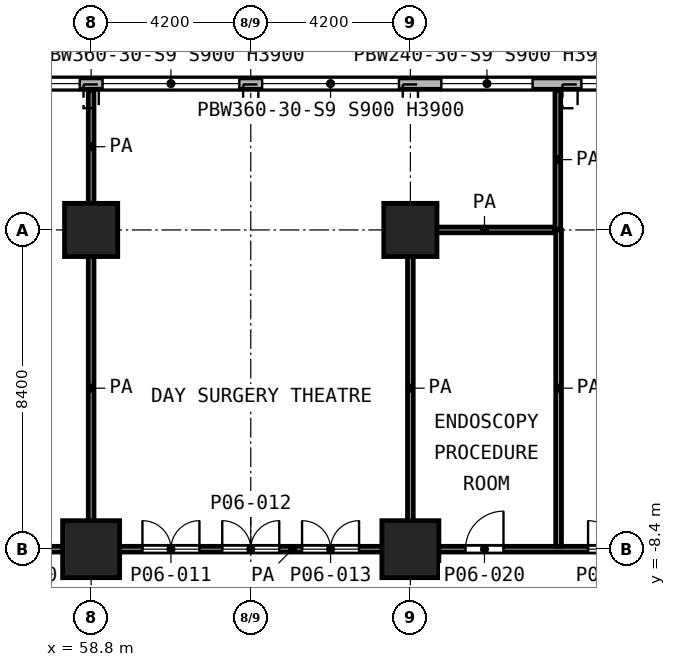
"""IFC4 building model, lengths in metres.
Left out: names, types, materials, properties, quantities, classifications, styles, units other than length and angle.
Written with IfcOpenShell. Run it as: python <this file> out.ifc"""

import sys

from ifc_helpers import new_model, si_unit, direction, frame, frame_2d, origin, origin_2d, place, context, subcontext, project, spatial, rectangle, extrude, element, fill, save


model = new_model("IFC4")
c1 = context("Model", 3, precision=1e-05, world=origin(), true_north=direction((0.0, 1.0)))
c2 = subcontext(c1, "Body", "Model", "MODEL_VIEW")
j1 = project(units=[si_unit("LENGTHUNIT", "METRE"), si_unit("PLANEANGLEUNIT", "RADIAN")], contexts=[c1])
p1 = place(None, origin())
s1 = spatial("IfcSite", under=j1, at=p1, CompositionType="ELEMENT")
p2 = place(p1, origin())
s2 = spatial("IfcBuilding", under=s1, at=p2, CompositionType="ELEMENT")
p3 = place(p2, frame((0.0, 0.0, 29.0)))
s3 = spatial("IfcBuildingStorey", under=s2, at=p3, CompositionType="ELEMENT", Elevation=29.0)
for number, where, z_axis, x_axis in (
    (1, (58.8, 0.0, 0.0), (0.0, 0.0, 1.0), (1.0, 0.0, 0.0)),
    (2, (67.2, 0.0, 0.0), (0.0, 0.0, 1.0), (1.0, 0.0, 0.0)),
):
    element("IfcColumn", number, at=place(p3, frame(where, z_axis=z_axis, x_axis=x_axis)), inside=s3, PredefinedType="COLUMN", context=c2, shape_type="SweptSolid", body=[
        extrude(rectangle(XDim=1.4, YDim=1.4, at=origin_2d()), origin(), (0.0, 0.0, 1.0), 5.2),
    ])
for number, where, z_axis, x_axis in (
    (3, (58.8, -8.4, 0.0), (0.0, 0.0, 1.0), (1.0, 0.0, 0.0)),
    (4, (67.2, -8.4, 0.0), (0.0, 0.0, 1.0), (1.0, 0.0, 0.0)),
):
    element("IfcColumn", number, at=place(p3, frame(where, z_axis=z_axis, x_axis=x_axis)), inside=s3, PredefinedType="COLUMN", context=c2, shape_type="SweptSolid", body=[
        extrude(rectangle(XDim=1.5, YDim=1.5, at=origin_2d()), origin(), (0.0, 0.0, 1.0), 5.2),
    ])
p4 = place(p3, frame((90.338, 3.85, 0.0), z_axis=(0.0, 0.0, 1.0), x_axis=(-1.0, 0.0, 0.0)))
e5 = element("IfcWall", 5, at=p4, inside=s3, PredefinedType="SOLIDWALL", context=c2, shape_type="SweptSolid", body=[
    extrude(rectangle(XDim=88.276, YDim=0.3, at=frame_2d((44.138, 0.0))), origin(), (0.0, 0.0, 1.0), 4.7),
])
p5 = place(p4, frame((0.438, 0.0, 0.9)))
e6 = element("IfcOpeningElement", 6, at=p5, cuts=e5, PredefinedType="OPENING", context=c2, shape_type="SweptSolid", body=[
    extrude(rectangle(XDim=1.2, YDim=3.0, at=frame_2d((0.6, 1.5))), frame((0.0, 0.16, 0.0), z_axis=(0.0, -1.0, 0.0), x_axis=(1.0, 0.0, 0.0)), (0.0, 0.0, 1.0), 0.32),
])
p6 = place(p4, frame((2.438, 0.0, 0.9)))
e7 = element("IfcOpeningElement", 7, at=p6, cuts=e5, PredefinedType="OPENING", context=c2, shape_type="SweptSolid", body=[
    extrude(rectangle(XDim=3.6, YDim=3.0, at=frame_2d((1.8, 1.5))), frame((0.0, 0.16, 0.0), z_axis=(0.0, -1.0, 0.0), x_axis=(1.0, 0.0, 0.0)), (0.0, 0.0, 1.0), 0.32),
])
p7 = place(p4, frame((6.638, 0.0, 0.9)))
e8 = element("IfcOpeningElement", 8, at=p7, cuts=e5, PredefinedType="OPENING", context=c2, shape_type="SweptSolid", body=[
    extrude(rectangle(XDim=3.6, YDim=3.0, at=frame_2d((1.8, 1.5))), frame((0.0, 0.16, 0.0), z_axis=(0.0, -1.0, 0.0), x_axis=(1.0, 0.0, 0.0)), (0.0, 0.0, 1.0), 0.32),
])
p8 = place(p4, frame((10.838, 0.0, 0.9)))
e9 = element("IfcOpeningElement", 9, at=p8, cuts=e5, PredefinedType="OPENING", context=c2, shape_type="SweptSolid", body=[
    extrude(rectangle(XDim=3.6, YDim=3.0, at=frame_2d((1.8, 1.5))), frame((0.0, 0.16, 0.0), z_axis=(0.0, -1.0, 0.0), x_axis=(1.0, 0.0, 0.0)), (0.0, 0.0, 1.0), 0.32),
])
p9 = place(p4, frame((15.038, 0.0, 0.9)))
e10 = element("IfcOpeningElement", 10, at=p9, cuts=e5, PredefinedType="OPENING", context=c2, shape_type="SweptSolid", body=[
    extrude(rectangle(XDim=3.6, YDim=3.0, at=frame_2d((1.8, 1.5))), frame((0.0, 0.16, 0.0), z_axis=(0.0, -1.0, 0.0), x_axis=(1.0, 0.0, 0.0)), (0.0, 0.0, 1.0), 0.32),
])
p10 = place(p4, frame((19.923, 0.0, 0.9)))
e11 = element("IfcOpeningElement", 11, at=p10, cuts=e5, PredefinedType="OPENING", context=c2, shape_type="SweptSolid", body=[
    extrude(rectangle(XDim=2.4, YDim=3.0, at=frame_2d((1.2, 1.5))), frame((0.0, 0.16, 0.0), z_axis=(0.0, -1.0, 0.0), x_axis=(1.0, 0.0, 0.0)), (0.0, 0.0, 1.0), 0.32),
])
p11 = place(p4, frame((23.438, 0.0, 0.9)))
e12 = element("IfcOpeningElement", 12, at=p11, cuts=e5, PredefinedType="OPENING", context=c2, shape_type="SweptSolid", body=[
    extrude(rectangle(XDim=3.6, YDim=3.0, at=frame_2d((1.8, 1.5))), frame((0.0, 0.16, 0.0), z_axis=(0.0, -1.0, 0.0), x_axis=(1.0, 0.0, 0.0)), (0.0, 0.0, 1.0), 0.32),
])
p12 = place(p4, frame((27.638, 0.0, 0.9)))
e13 = element("IfcOpeningElement", 13, at=p12, cuts=e5, PredefinedType="OPENING", context=c2, shape_type="SweptSolid", body=[
    extrude(rectangle(XDim=3.6, YDim=3.0, at=frame_2d((1.8, 1.5))), frame((0.0, 0.16, 0.0), z_axis=(0.0, -1.0, 0.0), x_axis=(1.0, 0.0, 0.0)), (0.0, 0.0, 1.0), 0.32),
])
p13 = place(p4, frame((31.838, 0.0, 0.9)))
e14 = element("IfcOpeningElement", 14, at=p13, cuts=e5, PredefinedType="OPENING", context=c2, shape_type="SweptSolid", body=[
    extrude(rectangle(XDim=3.6, YDim=3.0, at=frame_2d((1.8, 1.5))), frame((0.0, 0.16, 0.0), z_axis=(0.0, -1.0, 0.0), x_axis=(1.0, 0.0, 0.0)), (0.0, 0.0, 1.0), 0.32),
])
p14 = place(p4, frame((36.038, 0.0, 0.9)))
e15 = element("IfcOpeningElement", 15, at=p14, cuts=e5, PredefinedType="OPENING", context=c2, shape_type="SweptSolid", body=[
    extrude(rectangle(XDim=3.6, YDim=3.0, at=frame_2d((1.8, 1.5))), frame((0.0, 0.16, 0.0), z_axis=(0.0, -1.0, 0.0), x_axis=(1.0, 0.0, 0.0)), (0.0, 0.0, 1.0), 0.32),
])
p15 = place(p4, frame((40.238, 0.0, 0.9)))
e16 = element("IfcOpeningElement", 16, at=p15, cuts=e5, PredefinedType="OPENING", context=c2, shape_type="SweptSolid", body=[
    extrude(rectangle(XDim=3.6, YDim=3.0, at=frame_2d((1.8, 1.5))), frame((0.0, 0.16, 0.0), z_axis=(0.0, -1.0, 0.0), x_axis=(1.0, 0.0, 0.0)), (0.0, 0.0, 1.0), 0.32),
])
p16 = place(p4, frame((44.773, 0.0, 0.9)))
e17 = element("IfcOpeningElement", 17, at=p16, cuts=e5, PredefinedType="OPENING", context=c2, shape_type="SweptSolid", body=[
    extrude(rectangle(XDim=2.4, YDim=3.0, at=frame_2d((1.2, 1.5))), frame((0.0, 0.16, 0.0), z_axis=(0.0, -1.0, 0.0), x_axis=(1.0, 0.0, 0.0)), (0.0, 0.0, 1.0), 0.32),
])
p17 = place(p4, frame((49.173, 0.0, 0.9)))
e18 = element("IfcOpeningElement", 18, at=p17, cuts=e5, PredefinedType="OPENING", context=c2, shape_type="SweptSolid", body=[
    extrude(rectangle(XDim=2.4, YDim=3.0, at=frame_2d((1.2, 1.5))), frame((0.0, 0.16, 0.0), z_axis=(0.0, -1.0, 0.0), x_axis=(1.0, 0.0, 0.0)), (0.0, 0.0, 1.0), 0.32),
])
p18 = place(p4, frame((52.838, 0.0, 0.9)))
e19 = element("IfcOpeningElement", 19, at=p18, cuts=e5, PredefinedType="OPENING", context=c2, shape_type="SweptSolid", body=[
    extrude(rectangle(XDim=3.6, YDim=3.0, at=frame_2d((1.8, 1.5))), frame((0.0, 0.16, 0.0), z_axis=(0.0, -1.0, 0.0), x_axis=(1.0, 0.0, 0.0)), (0.0, 0.0, 1.0), 0.32),
])
p19 = place(p4, frame((57.038, 0.0, 0.9)))
e20 = element("IfcOpeningElement", 20, at=p19, cuts=e5, PredefinedType="OPENING", context=c2, shape_type="SweptSolid", body=[
    extrude(rectangle(XDim=3.6, YDim=3.0, at=frame_2d((1.8, 1.5))), frame((0.0, 0.16, 0.0), z_axis=(0.0, -1.0, 0.0), x_axis=(1.0, 0.0, 0.0)), (0.0, 0.0, 1.0), 0.32),
])
p20 = place(p4, frame((61.923, 0.0, 0.9)))
e21 = element("IfcOpeningElement", 21, at=p20, cuts=e5, PredefinedType="OPENING", context=c2, shape_type="SweptSolid", body=[
    extrude(rectangle(XDim=2.4, YDim=3.0, at=frame_2d((1.2, 1.5))), frame((0.0, 0.16, 0.0), z_axis=(0.0, -1.0, 0.0), x_axis=(1.0, 0.0, 0.0)), (0.0, 0.0, 1.0), 0.32),
])
p21 = place(p4, frame((65.438, 0.0, 0.9)))
e22 = element("IfcOpeningElement", 22, at=p21, cuts=e5, PredefinedType="OPENING", context=c2, shape_type="SweptSolid", body=[
    extrude(rectangle(XDim=3.6, YDim=3.0, at=frame_2d((1.8, 1.5))), frame((0.0, 0.16, 0.0), z_axis=(0.0, -1.0, 0.0), x_axis=(1.0, 0.0, 0.0)), (0.0, 0.0, 1.0), 0.32),
])
p22 = place(p4, frame((69.638, 0.0, 0.9)))
e23 = element("IfcOpeningElement", 23, at=p22, cuts=e5, PredefinedType="OPENING", context=c2, shape_type="SweptSolid", body=[
    extrude(rectangle(XDim=3.6, YDim=3.0, at=frame_2d((1.8, 1.5))), frame((0.0, 0.16, 0.0), z_axis=(0.0, -1.0, 0.0), x_axis=(1.0, 0.0, 0.0)), (0.0, 0.0, 1.0), 0.32),
])
p23 = place(p4, frame((73.838, 0.0, 0.9)))
e24 = element("IfcOpeningElement", 24, at=p23, cuts=e5, PredefinedType="OPENING", context=c2, shape_type="SweptSolid", body=[
    extrude(rectangle(XDim=3.6, YDim=3.0, at=frame_2d((1.8, 1.5))), frame((0.0, 0.16, 0.0), z_axis=(0.0, -1.0, 0.0), x_axis=(1.0, 0.0, 0.0)), (0.0, 0.0, 1.0), 0.32),
])
p24 = place(p4, frame((78.038, 0.0, 0.9)))
e25 = element("IfcOpeningElement", 25, at=p24, cuts=e5, PredefinedType="OPENING", context=c2, shape_type="SweptSolid", body=[
    extrude(rectangle(XDim=3.6, YDim=3.0, at=frame_2d((1.8, 1.5))), frame((0.0, 0.16, 0.0), z_axis=(0.0, -1.0, 0.0), x_axis=(1.0, 0.0, 0.0)), (0.0, 0.0, 1.0), 0.32),
])
p25 = place(p4, frame((82.238, 0.0, 0.9)))
e26 = element("IfcOpeningElement", 26, at=p25, cuts=e5, PredefinedType="OPENING", context=c2, shape_type="SweptSolid", body=[
    extrude(rectangle(XDim=3.6, YDim=3.0, at=frame_2d((1.8, 1.5))), frame((0.0, 0.16, 0.0), z_axis=(0.0, -1.0, 0.0), x_axis=(1.0, 0.0, 0.0)), (0.0, 0.0, 1.0), 0.32),
])
p26 = place(p4, frame((86.638, 0.0, 0.9)))
e27 = element("IfcOpeningElement", 27, at=p26, cuts=e5, PredefinedType="OPENING", context=c2, shape_type="SweptSolid", body=[
    extrude(rectangle(XDim=1.2, YDim=3.0, at=frame_2d((0.6, 1.5))), frame((0.0, 0.16, 0.0), z_axis=(0.0, -1.0, 0.0), x_axis=(1.0, 0.0, 0.0)), (0.0, 0.0, 1.0), 0.32),
])
p27 = place(p3, frame((51.0, -8.4, 0.0), z_axis=(0.0, 0.0, 1.0), x_axis=(1.0, 0.0, 0.0)))
e28 = element("IfcWall", 28, at=p27, inside=s3, PredefinedType="PARTITIONING", context=c2, shape_type="SweptSolid", body=[
    extrude(rectangle(XDim=26.2, YDim=0.15, at=frame_2d((13.1, 0.0))), origin(), (0.0, 0.0, 1.0), 4.7),
])
p28 = place(p27, frame((1.144, 0.0, 0.0)))
e29 = element("IfcOpeningElement", 29, at=p28, cuts=e28, PredefinedType="OPENING", context=c2, shape_type="SweptSolid", body=[
    extrude(rectangle(XDim=1.5, YDim=2.1, at=frame_2d((0.75, 1.05))), frame((0.0, 0.085, 0.0), z_axis=(0.0, -1.0, 0.0), x_axis=(1.0, 0.0, 0.0)), (0.0, 0.0, 1.0), 0.17),
])
p29 = place(p27, frame((3.112, 0.0, 0.0)))
e30 = element("IfcOpeningElement", 30, at=p29, cuts=e28, PredefinedType="OPENING", context=c2, shape_type="SweptSolid", body=[
    extrude(rectangle(XDim=1.5, YDim=2.1, at=frame_2d((0.75, 1.05))), frame((0.0, 0.085, 0.0), z_axis=(0.0, -1.0, 0.0), x_axis=(1.0, 0.0, 0.0)), (0.0, 0.0, 1.0), 0.17),
])
p30 = place(p27, frame((5.081, 0.0, 0.0)))
e31 = element("IfcOpeningElement", 31, at=p30, cuts=e28, PredefinedType="OPENING", context=c2, shape_type="SweptSolid", body=[
    extrude(rectangle(XDim=1.5, YDim=2.1, at=frame_2d((0.75, 1.05))), frame((0.0, 0.085, 0.0), z_axis=(0.0, -1.0, 0.0), x_axis=(1.0, 0.0, 0.0)), (0.0, 0.0, 1.0), 0.17),
])
p31 = place(p27, frame((9.15, 0.0, 0.0)))
e32 = element("IfcOpeningElement", 32, at=p31, cuts=e28, PredefinedType="OPENING", context=c2, shape_type="SweptSolid", body=[
    extrude(rectangle(XDim=1.5, YDim=2.1, at=frame_2d((0.75, 1.05))), frame((0.0, 0.085, 0.0), z_axis=(0.0, -1.0, 0.0), x_axis=(1.0, 0.0, 0.0)), (0.0, 0.0, 1.0), 0.17),
])
p32 = place(p27, frame((11.25, 0.0, 0.0)))
e33 = element("IfcOpeningElement", 33, at=p32, cuts=e28, PredefinedType="OPENING", context=c2, shape_type="SweptSolid", body=[
    extrude(rectangle(XDim=1.5, YDim=2.1, at=frame_2d((0.75, 1.05))), frame((0.0, 0.085, 0.0), z_axis=(0.0, -1.0, 0.0), x_axis=(1.0, 0.0, 0.0)), (0.0, 0.0, 1.0), 0.17),
])
p33 = place(p27, frame((13.35, 0.0, 0.0)))
e34 = element("IfcOpeningElement", 34, at=p33, cuts=e28, PredefinedType="OPENING", context=c2, shape_type="SweptSolid", body=[
    extrude(rectangle(XDim=1.5, YDim=2.1, at=frame_2d((0.75, 1.05))), frame((0.0, 0.085, 0.0), z_axis=(0.0, -1.0, 0.0), x_axis=(1.0, 0.0, 0.0)), (0.0, 0.0, 1.0), 0.17),
])
p34 = place(p27, frame((17.65, 0.0, 0.0)))
e35 = element("IfcOpeningElement", 35, at=p34, cuts=e28, PredefinedType="OPENING", context=c2, shape_type="SweptSolid", body=[
    extrude(rectangle(XDim=1.0, YDim=2.1, at=frame_2d((0.5, 1.05))), frame((0.0, 0.085, 0.0), z_axis=(0.0, -1.0, 0.0), x_axis=(1.0, 0.0, 0.0)), (0.0, 0.0, 1.0), 0.17),
])
p35 = place(p27, frame((20.875, 0.0, 0.0)))
e36 = element("IfcOpeningElement", 36, at=p35, cuts=e28, PredefinedType="OPENING", context=c2, shape_type="SweptSolid", body=[
    extrude(rectangle(XDim=1.5, YDim=2.1, at=frame_2d((0.75, 1.05))), frame((0.0, 0.085, 0.0), z_axis=(0.0, -1.0, 0.0), x_axis=(1.0, 0.0, 0.0)), (0.0, 0.0, 1.0), 0.17),
])
p36 = place(p27, frame((22.7, 0.0, 0.0)))
e37 = element("IfcOpeningElement", 37, at=p36, cuts=e28, PredefinedType="OPENING", context=c2, shape_type="SweptSolid", body=[
    extrude(rectangle(XDim=1.1, YDim=2.1, at=frame_2d((0.55, 1.05))), frame((0.0, 0.085, 0.0), z_axis=(0.0, -1.0, 0.0), x_axis=(1.0, 0.0, 0.0)), (0.0, 0.0, 1.0), 0.17),
])
p37 = place(p3, frame((67.295, 0.0, 0.0), z_axis=(0.0, 0.0, 1.0), x_axis=(1.0, 0.0, 0.0)))
e38 = element("IfcWall", 38, at=p37, inside=s3, PredefinedType="PARTITIONING", context=c2, shape_type="SweptSolid", body=[
    extrude(rectangle(XDim=3.71, YDim=0.15, at=frame_2d((1.855, 0.0))), origin(), (0.0, 0.0, 1.0), 4.7),
])
p38 = place(p3, frame((58.8, -8.325, 0.0), z_axis=(0.0, 0.0, 1.0), x_axis=(0.0, 1.0, 0.0)))
e39 = element("IfcWall", 39, at=p38, inside=s3, PredefinedType="PARTITIONING", context=c2, shape_type="SweptSolid", body=[
    extrude(rectangle(XDim=8.322, YDim=0.15, at=frame_2d((4.161, 0.0))), origin(), (0.0, 0.0, 1.0), 4.7),
])
p39 = place(p3, frame((58.8, 0.7, 0.0), z_axis=(0.0, 0.0, 1.0), x_axis=(0.0, 1.0, 0.0)))
e40 = element("IfcWall", 40, at=p39, inside=s3, PredefinedType="PARTITIONING", context=c2, shape_type="SweptSolid", body=[
    extrude(rectangle(XDim=2.98, YDim=0.15, at=frame_2d((1.49, 0.0))), origin(), (0.0, 0.0, 1.0), 4.7),
])
p40 = place(p3, frame((67.2, -8.325, 0.0), z_axis=(0.0, 0.0, 1.0), x_axis=(0.0, 1.0, 0.0)))
e41 = element("IfcWall", 41, at=p40, inside=s3, PredefinedType="PARTITIONING", context=c2, shape_type="SweptSolid", body=[
    extrude(rectangle(XDim=8.323, YDim=0.15, at=frame_2d((4.162, 0.0))), origin(), (0.0, 0.0, 1.0), 4.7),
])
p41 = place(p3, frame((71.08, 0.02, 0.0), z_axis=(0.0, 0.0, 1.0), x_axis=(0.0, 1.0, 0.0)))
e42 = element("IfcWall", 42, at=p41, inside=s3, PredefinedType="PARTITIONING", context=c2, shape_type="SweptSolid", body=[
    extrude(rectangle(XDim=3.66, YDim=0.15, at=frame_2d((1.83, 0.0))), origin(), (0.0, 0.0, 1.0), 4.7),
])
p42 = place(p3, frame((71.1, -8.325, 0.0), z_axis=(0.0, 0.0, 1.0), x_axis=(0.0, 1.0, 0.0)))
e43 = element("IfcWall", 43, at=p42, inside=s3, PredefinedType="PARTITIONING", context=c2, shape_type="SweptSolid", body=[
    extrude(rectangle(XDim=8.322, YDim=0.15, at=frame_2d((4.161, 0.0))), origin(), (0.0, 0.0, 1.0), 4.7),
])
p43 = place(p9, origin())
e44 = element("IfcWindow", 44, at=p43, inside=s3, PartitioningType="SINGLE_PANEL", PredefinedType="WINDOW", context=c2, shape_type="SweptSolid", body=[
    extrude(rectangle(XDim=3.6, YDim=3.0, at=frame_2d((1.8, 1.5))), frame((0.0, 0.03, 0.0), z_axis=(0.0, -1.0, 0.0), x_axis=(1.0, 0.0, 0.0)), (0.0, 0.0, 1.0), 0.06),
])
fill(e10, e44)
p44 = place(p10, origin())
e45 = element("IfcWindow", 45, at=p44, inside=s3, PartitioningType="SINGLE_PANEL", PredefinedType="WINDOW", context=c2, shape_type="SweptSolid", body=[
    extrude(rectangle(XDim=2.4, YDim=3.0, at=frame_2d((1.2, 1.5))), frame((0.0, 0.03, 0.0), z_axis=(0.0, -1.0, 0.0), x_axis=(1.0, 0.0, 0.0)), (0.0, 0.0, 1.0), 0.06),
])
fill(e11, e45)
p45 = place(p11, origin())
e46 = element("IfcWindow", 46, at=p45, inside=s3, PartitioningType="SINGLE_PANEL", PredefinedType="WINDOW", context=c2, shape_type="SweptSolid", body=[
    extrude(rectangle(XDim=3.6, YDim=3.0, at=frame_2d((1.8, 1.5))), frame((0.0, 0.03, 0.0), z_axis=(0.0, -1.0, 0.0), x_axis=(1.0, 0.0, 0.0)), (0.0, 0.0, 1.0), 0.06),
])
fill(e12, e46)
p46 = place(p12, origin())
e47 = element("IfcWindow", 47, at=p46, inside=s3, PartitioningType="SINGLE_PANEL", PredefinedType="WINDOW", context=c2, shape_type="SweptSolid", body=[
    extrude(rectangle(XDim=3.6, YDim=3.0, at=frame_2d((1.8, 1.5))), frame((0.0, 0.03, 0.0), z_axis=(0.0, -1.0, 0.0), x_axis=(1.0, 0.0, 0.0)), (0.0, 0.0, 1.0), 0.06),
])
fill(e13, e47)
p47 = place(p13, origin())
e48 = element("IfcWindow", 48, at=p47, inside=s3, PartitioningType="SINGLE_PANEL", PredefinedType="WINDOW", context=c2, shape_type="SweptSolid", body=[
    extrude(rectangle(XDim=3.6, YDim=3.0, at=frame_2d((1.8, 1.5))), frame((0.0, 0.03, 0.0), z_axis=(0.0, -1.0, 0.0), x_axis=(1.0, 0.0, 0.0)), (0.0, 0.0, 1.0), 0.06),
])
fill(e14, e48)
p48 = place(p31, origin())
e49 = element("IfcDoor", 49, at=p48, inside=s3, OperationType="DOUBLE_DOOR_SINGLE_SWING", PredefinedType="DOOR", context=c2, shape_type="SweptSolid", body=[
    extrude(rectangle(XDim=1.5, YDim=2.1, at=frame_2d((0.75, 1.05))), frame((0.0, 0.025, 0.0), z_axis=(0.0, -1.0, 0.0), x_axis=(1.0, 0.0, 0.0)), (0.0, 0.0, 1.0), 0.05),
])
fill(e32, e49)
p49 = place(p32, origin())
e50 = element("IfcDoor", 50, at=p49, inside=s3, OperationType="DOUBLE_DOOR_SINGLE_SWING", PredefinedType="DOOR", context=c2, shape_type="SweptSolid", body=[
    extrude(rectangle(XDim=1.5, YDim=2.1, at=frame_2d((0.75, 1.05))), frame((0.0, 0.025, 0.0), z_axis=(0.0, -1.0, 0.0), x_axis=(1.0, 0.0, 0.0)), (0.0, 0.0, 1.0), 0.05),
])
fill(e33, e50)
p50 = place(p33, origin())
e51 = element("IfcDoor", 51, at=p50, inside=s3, OperationType="DOUBLE_DOOR_SINGLE_SWING", PredefinedType="DOOR", context=c2, shape_type="SweptSolid", body=[
    extrude(rectangle(XDim=1.5, YDim=2.1, at=frame_2d((0.75, 1.05))), frame((0.0, 0.025, 0.0), z_axis=(0.0, -1.0, 0.0), x_axis=(1.0, 0.0, 0.0)), (0.0, 0.0, 1.0), 0.05),
])
fill(e34, e51)
p51 = place(p34, origin())
e52 = element("IfcDoor", 52, at=p51, inside=s3, OperationType="SINGLE_SWING_RIGHT", PredefinedType="DOOR", context=c2, shape_type="SweptSolid", body=[
    extrude(rectangle(XDim=1.0, YDim=2.1, at=frame_2d((0.5, 1.05))), frame((0.0, 0.025, 0.0), z_axis=(0.0, -1.0, 0.0), x_axis=(1.0, 0.0, 0.0)), (0.0, 0.0, 1.0), 0.05),
])
fill(e35, e52)
p52 = place(p35, origin())
e53 = element("IfcDoor", 53, at=p52, inside=s3, OperationType="DOUBLE_DOOR_SINGLE_SWING", PredefinedType="DOOR", context=c2, shape_type="SweptSolid", body=[
    extrude(rectangle(XDim=1.5, YDim=2.1, at=frame_2d((0.75, 1.05))), frame((0.0, 0.025, 0.0), z_axis=(0.0, -1.0, 0.0), x_axis=(1.0, 0.0, 0.0)), (0.0, 0.0, 1.0), 0.05),
])
fill(e36, e53)
save(model, sys.argv[1])
